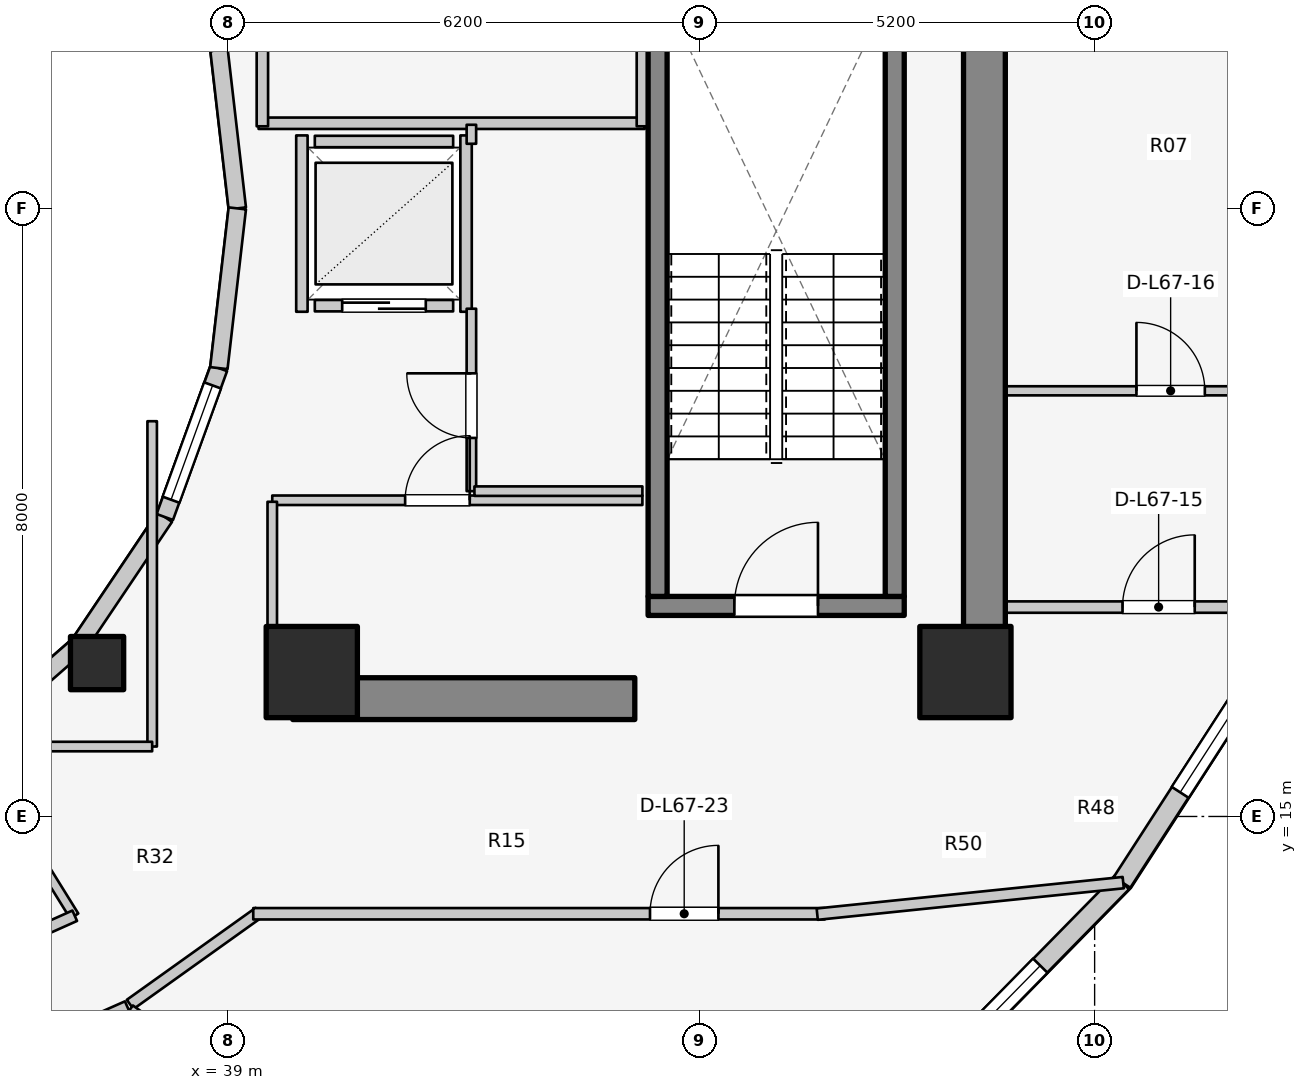
"""IFC4 building model, lengths in metres.
Left out: names, types, materials, properties, quantities, classifications, styles, units other than length and angle.
Written with IfcOpenShell. Run it as: python <this file> out.ifc"""

import sys

from ifc_helpers import new_model, si_unit, direction, frame, frame_2d, origin, origin_2d, place, context, subcontext, project, spatial, rectangle, extrude, element, fill, save


model = new_model("IFC4")
c1 = context("Model", 3, precision=1e-05, world=origin(), true_north=direction((0.0, 1.0)))
c2 = subcontext(c1, "Body", "Model", "MODEL_VIEW")
j1 = project(units=[si_unit("LENGTHUNIT", "METRE"), si_unit("PLANEANGLEUNIT", "RADIAN")], contexts=[c1])
p1 = place(None, origin())
s1 = spatial("IfcSite", under=j1, at=p1, CompositionType="ELEMENT")
p2 = place(p1, origin())
s2 = spatial("IfcBuilding", under=s1, at=p2, CompositionType="ELEMENT")
p3 = place(p2, frame((0.0, 0.0, 220.2)))
s3 = spatial("IfcBuildingStorey", under=s2, at=p3, CompositionType="ELEMENT", Elevation=220.2)
p4 = place(p3, frame((48.95, 17.05, 0.0), z_axis=(0.0, 0.0, 1.0), x_axis=(0.0, 1.0, 0.0)))
e1 = element("IfcWall", 1, at=p4, inside=s3, PredefinedType="SHEAR", context=c2, shape_type="SweptSolid", body=[
    extrude(rectangle(XDim=12.8, YDim=0.55, at=frame_2d((6.4, 0.0))), origin(), (0.0, 0.0, 1.0), 3.1),
])
p5 = place(p3, frame((39.85, 16.55, 0.0), z_axis=(0.0, 0.0, 1.0), x_axis=(1.0, 0.0, 0.0)))
e2 = element("IfcWall", 2, at=p5, inside=s3, PredefinedType="SHEAR", context=c2, shape_type="SweptSolid", body=[
    extrude(rectangle(XDim=4.5, YDim=0.55, at=frame_2d((2.25, 0.0))), origin(), (0.0, 0.0, 1.0), 3.1),
])
p6 = place(p3, frame((44.525, 17.77, 0.0), z_axis=(0.0, 0.0, 1.0), x_axis=(1.0, 0.0, 0.0)))
e3 = element("IfcWall", 3, at=p6, inside=s3, PredefinedType="SOLIDWALL", context=c2, shape_type="SweptSolid", body=[
    extrude(rectangle(XDim=3.37, YDim=0.25, at=frame_2d((1.685, 0.0))), origin(), (0.0, 0.0, 1.0), 3.1),
])
p7 = place(p6, frame((1.135, 0.0, 0.0)))
e4 = element("IfcOpeningElement", 4, at=p7, cuts=e3, PredefinedType="OPENING", context=c2, shape_type="SweptSolid", body=[
    extrude(rectangle(XDim=1.1, YDim=2.1, at=frame_2d((0.55, 1.05))), frame((0.0, 0.135, 0.0), z_axis=(0.0, -1.0, 0.0), x_axis=(1.0, 0.0, 0.0)), (0.0, 0.0, 1.0), 0.27),
])
for number, where, z_axis, x_axis in (
    (5, (44.65, 17.895, 0.0), (0.0, 0.0, 1.0), (0.0, 1.0, 0.0)),
    (6, (47.77, 17.895, 0.0), (0.0, 0.0, 1.0), (0.0, 1.0, 0.0)),
):
    element("IfcWall", number, at=place(p3, frame(where, z_axis=z_axis, x_axis=x_axis)), inside=s3, PredefinedType="SOLIDWALL", context=c2, shape_type="SweptSolid", body=[
        extrude(rectangle(XDim=7.81, YDim=0.25, at=frame_2d((3.905, 0.0))), origin(), (0.0, 0.0, 1.0), 3.1),
    ])
for number, where, z_axis, x_axis in (
    (7, (40.1, 16.9, 0.0), (0.0, 0.0, 1.0), (1.0, 0.0, 0.0)),
    (8, (48.7, 16.9, 0.0), (0.0, 0.0, 1.0), (1.0, 0.0, 0.0)),
):
    element("IfcColumn", number, at=place(p3, frame(where, z_axis=z_axis, x_axis=x_axis)), inside=s3, PredefinedType="COLUMN", context=c2, shape_type="SweptSolid", body=[
        extrude(rectangle(XDim=1.2, YDim=1.2, at=origin_2d()), origin(), (0.0, 0.0, 1.0), 3.1),
    ])
p8 = place(p3, frame((37.275, 17.018, 0.0), z_axis=(0.0, 0.0, 1.0), x_axis=(1.0, 0.0, 0.0)))
e9 = element("IfcColumn", 9, at=p8, inside=s3, PredefinedType="COLUMN", context=c2, shape_type="SweptSolid", body=[
    extrude(rectangle(XDim=0.7, YDim=0.7, at=origin_2d()), origin(), (0.0, 0.0, 1.0), 3.1),
])
p9 = place(p3, frame((39.12, 23.0, 0.0), z_axis=(0.0, 0.0, 1.0), x_axis=(-0.114711713601, 0.993398823617, 0.0)))
e10 = element("IfcWall", 10, at=p9, inside=s3, PredefinedType="STANDARD", context=c2, shape_type="SweptSolid", body=[
    extrude(rectangle(XDim=2.115, YDim=0.23, at=frame_2d((1.058, 0.0))), origin(), (0.0, 0.0, 1.0), 2.84),
])
p10 = place(p3, frame((35.56, 15.968, 0.0), z_axis=(0.0, 0.0, 1.0), x_axis=(0.752576694707, 0.658504607869, 0.0)))
e11 = element("IfcWall", 11, at=p10, inside=s3, PredefinedType="STANDARD", context=c2, shape_type="SweptSolid", body=[
    extrude(rectangle(XDim=1.959, YDim=0.23, at=frame_2d((0.98, 0.0))), origin(), (0.0, 0.0, 1.0), 2.16),
])
p11 = place(p3, frame((37.035, 17.258, 0.0), z_axis=(0.0, 0.0, 1.0), x_axis=(0.558197800898, 0.829707909492, 0.0)))
e12 = element("IfcWall", 12, at=p11, inside=s3, PredefinedType="STANDARD", context=c2, shape_type="SweptSolid", body=[
    extrude(rectangle(XDim=2.027, YDim=0.23, at=frame_2d((1.013, 0.0))), origin(), (0.0, 0.0, 1.0), 2.16),
])
p12 = place(p3, frame((38.166, 18.94, 0.0), z_axis=(0.0, 0.0, 1.0), x_axis=(0.341423187295, 0.93990968033, 0.0)))
e13 = element("IfcWall", 13, at=p12, inside=s3, PredefinedType="STANDARD", context=c2, shape_type="SweptSolid", body=[
    extrude(rectangle(XDim=2.084, YDim=0.23, at=frame_2d((1.042, 0.0))), origin(), (0.0, 0.0, 1.0), 2.84),
])
p13 = place(p12, frame((0.242, 0.0, 0.85)))
e14 = element("IfcOpeningElement", 14, at=p13, cuts=e13, PredefinedType="OPENING", context=c2, shape_type="SweptSolid", body=[
    extrude(rectangle(XDim=1.6, YDim=1.65, at=frame_2d((0.8, 0.825))), frame((0.0, 0.125, 0.0), z_axis=(0.0, -1.0, 0.0), x_axis=(1.0, 0.0, 0.0)), (0.0, 0.0, 1.0), 0.25),
])
p14 = place(p3, frame((38.877, 20.898, 0.0), z_axis=(0.0, 0.0, 1.0), x_axis=(0.114711713601, 0.993398823617, 0.0)))
e15 = element("IfcWall", 15, at=p14, inside=s3, PredefinedType="STANDARD", context=c2, shape_type="SweptSolid", body=[
    extrude(rectangle(XDim=2.115, YDim=0.23, at=frame_2d((1.058, 0.0))), origin(), (0.0, 0.0, 1.0), 2.84),
])
p15 = place(p3, frame((47.558, 10.871, 0.0), z_axis=(0.0, 0.0, 1.0), x_axis=(0.700642973333, 0.713512034881, 0.0)))
e16 = element("IfcWall", 16, at=p15, inside=s3, PredefinedType="STANDARD", context=c2, shape_type="SweptSolid", body=[
    extrude(rectangle(XDim=4.572, YDim=0.26, at=frame_2d((2.286, 0.0))), origin(), (0.0, 0.0, 1.0), 2.85),
])
p16 = place(p15, frame((1.536, 0.0, 0.75)))
e17 = element("IfcOpeningElement", 17, at=p16, cuts=e16, PredefinedType="OPENING", context=c2, shape_type="SweptSolid", body=[
    extrude(rectangle(XDim=1.5, YDim=1.6, at=frame_2d((0.75, 0.8))), frame((0.0, 0.14, 0.0), z_axis=(0.0, -1.0, 0.0), x_axis=(1.0, 0.0, 0.0)), (0.0, 0.0, 1.0), 0.28),
])
p17 = place(p3, frame((50.761, 14.133, 0.0), z_axis=(0.0, 0.0, 1.0), x_axis=(0.542641766008, 0.839964233634, 0.0)))
e18 = element("IfcWall", 18, at=p17, inside=s3, PredefinedType="STANDARD", context=c2, shape_type="SweptSolid", body=[
    extrude(rectangle(XDim=4.319, YDim=0.26, at=frame_2d((2.16, 0.0))), origin(), (0.0, 0.0, 1.0), 2.85),
])
p18 = place(p17, frame((1.41, 0.0, 0.75)))
e19 = element("IfcOpeningElement", 19, at=p18, cuts=e18, PredefinedType="OPENING", context=c2, shape_type="SweptSolid", body=[
    extrude(rectangle(XDim=1.5, YDim=1.6, at=frame_2d((0.75, 0.8))), frame((0.0, 0.14, 0.0), z_axis=(0.0, -1.0, 0.0), x_axis=(1.0, 0.0, 0.0)), (0.0, 0.0, 1.0), 0.28),
])
p19 = place(p3, frame((40.14, 21.72, 0.0), z_axis=(0.0, 0.0, 1.0), x_axis=(1.0, 0.0, 0.0)))
e20 = element("IfcWall", 20, at=p19, inside=s3, PredefinedType="SOLIDWALL", context=c2, shape_type="SweptSolid", body=[
    extrude(rectangle(XDim=1.82, YDim=0.15, at=frame_2d((0.91, 0.0))), origin(), (0.0, 0.0, 1.0), 2.12),
])
p20 = place(p19, frame((0.36, 0.0, 0.0)))
e21 = element("IfcOpeningElement", 21, at=p20, cuts=e20, PredefinedType="OPENING", context=c2, shape_type="SweptSolid", body=[
    extrude(rectangle(XDim=1.1, YDim=2.1, at=frame_2d((0.55, 1.05))), frame((0.0, 0.085, 0.0), z_axis=(0.0, -1.0, 0.0), x_axis=(1.0, 0.0, 0.0)), (0.0, 0.0, 1.0), 0.17),
])
p21 = place(p3, frame((40.14, 23.88, 0.0), z_axis=(0.0, 0.0, 1.0), x_axis=(1.0, 0.0, 0.0)))
e22 = element("IfcWall", 22, at=p21, inside=s3, PredefinedType="SOLIDWALL", context=c2, shape_type="SweptSolid", body=[
    extrude(rectangle(XDim=1.82, YDim=0.15, at=frame_2d((0.91, 0.0))), origin(), (0.0, 0.0, 1.0), 2.12),
])
p22 = place(p3, frame((39.97, 21.64, 0.0), z_axis=(0.0, 0.0, 1.0), x_axis=(0.0, 1.0, 0.0)))
e23 = element("IfcWall", 23, at=p22, inside=s3, PredefinedType="SOLIDWALL", context=c2, shape_type="SweptSolid", body=[
    extrude(rectangle(XDim=2.32, YDim=0.15, at=frame_2d((1.16, 0.0))), origin(), (0.0, 0.0, 1.0), 2.12),
])
p23 = place(p3, frame((42.13, 21.64, 0.0), z_axis=(0.0, 0.0, 1.0), x_axis=(0.0, 1.0, 0.0)))
e24 = element("IfcWall", 24, at=p23, inside=s3, PredefinedType="SOLIDWALL", context=c2, shape_type="SweptSolid", body=[
    extrude(rectangle(XDim=2.32, YDim=0.15, at=frame_2d((1.16, 0.0))), origin(), (0.0, 0.0, 1.0), 2.855),
])
p24 = place(p3, frame((39.4, 24.12, 0.0), z_axis=(0.0, 0.0, 1.0), x_axis=(1.0, 0.0, 0.0)))
e25 = element("IfcWall", 25, at=p24, inside=s3, PredefinedType="PARTITIONING", context=c2, shape_type="SweptSolid", body=[
    extrude(rectangle(XDim=5.08, YDim=0.15, at=frame_2d((2.54, 0.0))), origin(), (0.0, 0.0, 1.0), 2.12),
])
p25 = place(p3, frame((44.45, 24.08, 0.0), z_axis=(0.0, 0.0, 1.0), x_axis=(0.0, 1.0, 0.0)))
e26 = element("IfcWall", 26, at=p25, inside=s3, PredefinedType="PARTITIONING", context=c2, shape_type="SweptSolid", body=[
    extrude(rectangle(XDim=3.2, YDim=0.15, at=frame_2d((1.6, 0.0))), origin(), (0.0, 0.0, 1.0), 2.855),
])
p26 = place(p3, frame((39.45, 24.08, 0.0), z_axis=(0.0, 0.0, 1.0), x_axis=(0.0, 1.0, 0.0)))
e27 = element("IfcWall", 27, at=p26, inside=s3, PredefinedType="PARTITIONING", context=c2, shape_type="SweptSolid", body=[
    extrude(rectangle(XDim=3.4, YDim=0.15, at=frame_2d((1.7, 0.0))), origin(), (0.0, 0.0, 1.0), 2.855),
])
p27 = place(p26, frame((1.894, 0.0, 0.0)))
e28 = element("IfcOpeningElement", 28, at=p27, cuts=e27, PredefinedType="OPENING", context=c2, shape_type="SweptSolid", body=[
    extrude(rectangle(XDim=1.1, YDim=2.1, at=frame_2d((0.55, 1.05))), frame((0.0, 0.085, 0.0), z_axis=(0.0, -1.0, 0.0), x_axis=(1.0, 0.0, 0.0)), (0.0, 0.0, 1.0), 0.17),
])
p28 = place(p3, frame((39.58, 19.16, 0.0), z_axis=(0.0, 0.0, 1.0), x_axis=(1.0, 0.0, 0.0)))
e29 = element("IfcWall", 29, at=p28, inside=s3, PredefinedType="PARTITIONING", context=c2, shape_type="SweptSolid", body=[
    extrude(rectangle(XDim=4.87, YDim=0.125, at=frame_2d((2.435, 0.0))), origin(), (0.0, 0.0, 1.0), 2.12),
])
p29 = place(p28, frame((1.748, 0.0, 0.0)))
e30 = element("IfcOpeningElement", 30, at=p29, cuts=e29, PredefinedType="OPENING", context=c2, shape_type="SweptSolid", body=[
    extrude(rectangle(XDim=0.85, YDim=2.05, at=frame_2d((0.425, 1.025))), frame((0.0, 0.073, 0.0), z_axis=(0.0, -1.0, 0.0), x_axis=(1.0, 0.0, 0.0)), (0.0, 0.0, 1.0), 0.145),
])
p30 = place(p3, frame((39.58, 17.1, 0.0), z_axis=(0.0, 0.0, 1.0), x_axis=(0.0, 1.0, 0.0)))
e31 = element("IfcWall", 31, at=p30, inside=s3, PredefinedType="PARTITIONING", context=c2, shape_type="SweptSolid", body=[
    extrude(rectangle(XDim=2.04, YDim=0.125, at=frame_2d((1.02, 0.0))), origin(), (0.0, 0.0, 1.0), 2.232),
])
p31 = place(p3, frame((42.2, 19.28, 0.0), z_axis=(0.0, 0.0, 1.0), x_axis=(0.0, 1.0, 0.0)))
e32 = element("IfcWall", 32, at=p31, inside=s3, PredefinedType="PARTITIONING", context=c2, shape_type="SweptSolid", body=[
    extrude(rectangle(XDim=2.4, YDim=0.125, at=frame_2d((1.2, 0.0))), origin(), (0.0, 0.0, 1.0), 2.855),
])
p32 = place(p31, frame((0.7, 0.0, 0.0)))
e33 = element("IfcOpeningElement", 33, at=p32, cuts=e32, PredefinedType="OPENING", context=c2, shape_type="SweptSolid", body=[
    extrude(rectangle(XDim=0.85, YDim=2.05, at=frame_2d((0.425, 1.025))), frame((0.0, 0.073, 0.0), z_axis=(0.0, -1.0, 0.0), x_axis=(1.0, 0.0, 0.0)), (0.0, 0.0, 1.0), 0.145),
])
p33 = place(p3, frame((42.2, 23.85, 0.0), z_axis=(0.0, 0.0, 1.0), x_axis=(0.0, 1.0, 0.0)))
e34 = element("IfcWall", 34, at=p33, inside=s3, PredefinedType="PARTITIONING", context=c2, shape_type="SweptSolid", body=[
    extrude(rectangle(XDim=0.25, YDim=0.125, at=frame_2d((0.125, 0.0))), origin(), (0.0, 0.0, 1.0), 2.855),
])
p34 = place(p3, frame((42.24, 19.28, 0.0), z_axis=(0.0, 0.0, 1.0), x_axis=(1.0, 0.0, 0.0)))
e35 = element("IfcWall", 35, at=p34, inside=s3, PredefinedType="PARTITIONING", context=c2, shape_type="SweptSolid", body=[
    extrude(rectangle(XDim=2.21, YDim=0.125, at=frame_2d((1.105, 0.0))), origin(), (0.0, 0.0, 1.0), 2.12),
])
p35 = place(p3, frame((35.55, 15.985, 0.0), z_axis=(0.0, 0.0, 1.0), x_axis=(0.527527080983, -0.849538215049, 0.0)))
e36 = element("IfcWall", 36, at=p35, inside=s3, PredefinedType="PARTITIONING", context=c2, shape_type="SweptSolid", body=[
    extrude(rectangle(XDim=2.701, YDim=0.125, at=frame_2d((1.351, 0.0))), origin(), (0.0, 0.0, 1.0), 2.376),
])
p36 = place(p3, frame((34.573, 12.616, 0.0), z_axis=(0.0, 0.0, 1.0), x_axis=(0.912628408652, 0.408790151203, 0.0)))
e37 = element("IfcWall", 37, at=p36, inside=s3, PredefinedType="PARTITIONING", context=c2, shape_type="SweptSolid", body=[
    extrude(rectangle(XDim=2.638, YDim=0.15, at=frame_2d((1.319, 0.0))), origin(), (0.0, 0.0, 1.0), 2.376),
])
p37 = place(p36, frame((0.844, 0.0, 0.0)))
e38 = element("IfcOpeningElement", 38, at=p37, cuts=e37, PredefinedType="OPENING", context=c2, shape_type="SweptSolid", body=[
    extrude(rectangle(XDim=0.95, YDim=2.1, at=frame_2d((0.475, 1.05))), frame((0.0, 0.085, 0.0), z_axis=(0.0, -1.0, 0.0), x_axis=(1.0, 0.0, 0.0)), (0.0, 0.0, 1.0), 0.17),
])
p38 = place(p3, frame((38.0, 15.92, 0.0), z_axis=(0.0, 0.0, 1.0), x_axis=(0.0, 1.0, 0.0)))
e39 = element("IfcWall", 39, at=p38, inside=s3, PredefinedType="PARTITIONING", context=c2, shape_type="SweptSolid", body=[
    extrude(rectangle(XDim=4.28, YDim=0.125, at=frame_2d((2.14, 0.0))), origin(), (0.0, 0.0, 1.0), 2.232),
])
p39 = place(p3, frame((35.4, 15.92, 0.0), z_axis=(0.0, 0.0, 1.0), x_axis=(1.0, 0.0, 0.0)))
e40 = element("IfcWall", 40, at=p39, inside=s3, PredefinedType="PARTITIONING", context=c2, shape_type="SweptSolid", body=[
    extrude(rectangle(XDim=2.6, YDim=0.125, at=frame_2d((1.3, 0.0))), origin(), (0.0, 0.0, 1.0), 2.232),
])
p40 = place(p3, frame((48.95, 17.755, 0.0), z_axis=(0.0, 0.0, 1.0), x_axis=(1.0, 0.0, 0.0)))
e41 = element("IfcWall", 41, at=p40, inside=s3, PredefinedType="PARTITIONING", context=c2, shape_type="SweptSolid", body=[
    extrude(rectangle(XDim=4.175, YDim=0.15, at=frame_2d((2.087, 0.0))), origin(), (0.0, 0.0, 1.0), 2.855),
])
p41 = place(p40, frame((1.817, 0.0, 0.0)))
e42 = element("IfcOpeningElement", 42, at=p41, cuts=e41, PredefinedType="OPENING", context=c2, shape_type="SweptSolid", body=[
    extrude(rectangle(XDim=0.95, YDim=2.1, at=frame_2d((0.475, 1.05))), frame((0.0, 0.085, 0.0), z_axis=(0.0, -1.0, 0.0), x_axis=(1.0, 0.0, 0.0)), (0.0, 0.0, 1.0), 0.17),
])
p42 = place(p3, frame((48.95, 20.6, 0.0), z_axis=(0.0, 0.0, 1.0), x_axis=(1.0, 0.0, 0.0)))
e43 = element("IfcWall", 43, at=p42, inside=s3, PredefinedType="MOVABLE", context=c2, shape_type="SweptSolid", body=[
    extrude(rectangle(XDim=4.524, YDim=0.12, at=frame_2d((2.262, 0.0))), origin(), (0.0, 0.0, 1.0), 2.855),
])
p43 = place(p42, frame((2.0, 0.0, 0.0)))
e44 = element("IfcOpeningElement", 44, at=p43, cuts=e43, PredefinedType="OPENING", context=c2, shape_type="SweptSolid", body=[
    extrude(rectangle(XDim=0.9, YDim=2.1, at=frame_2d((0.45, 1.05))), frame((0.0, 0.07, 0.0), z_axis=(0.0, -1.0, 0.0), x_axis=(1.0, 0.0, 0.0)), (0.0, 0.0, 1.0), 0.14),
])
p44 = place(p3, frame((37.71, 12.527, 0.0), z_axis=(0.0, 0.0, 1.0), x_axis=(0.813780999276, 0.581171648669, 0.0)))
e45 = element("IfcWall", 45, at=p44, inside=s3, PredefinedType="PARTITIONING", context=c2, shape_type="SweptSolid", body=[
    extrude(rectangle(XDim=2.082, YDim=0.15, at=frame_2d((1.041, 0.0))), origin(), (0.0, 0.0, 1.0), 2.376),
])
p45 = place(p3, frame((39.33, 13.72, 0.0), z_axis=(0.0, 0.0, 1.0), x_axis=(1.0, 0.0, 0.0)))
e46 = element("IfcWall", 46, at=p45, inside=s3, PredefinedType="PARTITIONING", context=c2, shape_type="SweptSolid", body=[
    extrude(rectangle(XDim=7.52, YDim=0.15, at=frame_2d((3.76, 0.0))), origin(), (0.0, 0.0, 1.0), 2.376),
])
p46 = place(p45, frame((5.22, 0.0, 0.0)))
e47 = element("IfcOpeningElement", 47, at=p46, cuts=e46, PredefinedType="OPENING", context=c2, shape_type="SweptSolid", body=[
    extrude(rectangle(XDim=0.9, YDim=2.1, at=frame_2d((0.45, 1.05))), frame((0.0, 0.085, 0.0), z_axis=(0.0, -1.0, 0.0), x_axis=(1.0, 0.0, 0.0)), (0.0, 0.0, 1.0), 0.17),
])
p47 = place(p3, frame((46.75, 13.715, 0.0), z_axis=(0.0, 0.0, 1.0), x_axis=(0.994734711466, 0.102483431859, 0.0)))
e48 = element("IfcWall", 48, at=p47, inside=s3, PredefinedType="PARTITIONING", context=c2, shape_type="SweptSolid", body=[
    extrude(rectangle(XDim=4.047, YDim=0.15, at=frame_2d((2.024, 0.0))), origin(), (0.0, 0.0, 1.0), 2.22),
])
p48 = place(p3, frame((37.71, 12.463, 0.0), z_axis=(0.0, 0.0, 1.0), x_axis=(0.813163816543, -0.582034885093, 0.0)))
e49 = element("IfcWall", 49, at=p48, inside=s3, PredefinedType="PARTITIONING", context=c2, shape_type="SweptSolid", body=[
    extrude(rectangle(XDim=6.955, YDim=0.125, at=frame_2d((3.477, 0.0))), origin(), (0.0, 0.0, 1.0), 2.376),
])
p49 = place(p3, frame((34.925, 11.281, 0.0), z_axis=(0.0, 0.0, 1.0), x_axis=(0.914139569865, 0.405399613724, 0.0)))
e50 = element("IfcWall", 50, at=p49, inside=s3, PredefinedType="PARTITIONING", context=c2, shape_type="SweptSolid", body=[
    extrude(rectangle(XDim=3.005, YDim=0.15, at=frame_2d((1.502, 0.0))), origin(), (0.0, 0.0, 1.0), 2.376),
])
p50 = place(p49, frame((1.002, 0.0, 0.0)))
e51 = element("IfcOpeningElement", 51, at=p50, cuts=e50, PredefinedType="OPENING", context=c2, shape_type="SweptSolid", body=[
    extrude(rectangle(XDim=1.0, YDim=2.1, at=frame_2d((0.5, 1.05))), frame((0.0, 0.085, 0.0), z_axis=(0.0, -1.0, 0.0), x_axis=(1.0, 0.0, 0.0)), (0.0, 0.0, 1.0), 0.17),
])
p51 = place(p13, origin())
e52 = element("IfcWindow", 52, at=p51, inside=s3, PartitioningType="SINGLE_PANEL", PredefinedType="WINDOW", context=c2, shape_type="SweptSolid", body=[
    extrude(rectangle(XDim=1.6, YDim=1.65, at=frame_2d((0.8, 0.825))), frame((0.0, 0.03, 0.0), z_axis=(0.0, -1.0, 0.0), x_axis=(1.0, 0.0, 0.0)), (0.0, 0.0, 1.0), 0.06),
])
fill(e14, e52)
p52 = place(p16, origin())
e53 = element("IfcWindow", 53, at=p52, inside=s3, PartitioningType="SINGLE_PANEL", PredefinedType="WINDOW", context=c2, shape_type="SweptSolid", body=[
    extrude(rectangle(XDim=1.5, YDim=1.6, at=frame_2d((0.75, 0.8))), frame((0.0, 0.03, 0.0), z_axis=(0.0, -1.0, 0.0), x_axis=(1.0, 0.0, 0.0)), (0.0, 0.0, 1.0), 0.06),
])
fill(e17, e53)
p53 = place(p18, origin())
e54 = element("IfcWindow", 54, at=p53, inside=s3, PartitioningType="SINGLE_PANEL", PredefinedType="WINDOW", context=c2, shape_type="SweptSolid", body=[
    extrude(rectangle(XDim=1.5, YDim=1.6, at=frame_2d((0.75, 0.8))), frame((0.0, 0.03, 0.0), z_axis=(0.0, -1.0, 0.0), x_axis=(1.0, 0.0, 0.0)), (0.0, 0.0, 1.0), 0.06),
])
fill(e19, e54)
p54 = place(p7, origin())
e55 = element("IfcDoor", 55, at=p54, inside=s3, OperationType="SINGLE_SWING_RIGHT", PredefinedType="DOOR", context=c2, shape_type="SweptSolid", body=[
    extrude(rectangle(XDim=1.1, YDim=2.1, at=frame_2d((0.55, 1.05))), frame((0.0, 0.025, 0.0), z_axis=(0.0, -1.0, 0.0), x_axis=(1.0, 0.0, 0.0)), (0.0, 0.0, 1.0), 0.05),
])
fill(e4, e55)
p55 = place(p20, origin())
e56 = element("IfcDoor", 56, at=p55, inside=s3, OperationType="DOUBLE_DOOR_SLIDING", PredefinedType="DOOR", context=c2, shape_type="SweptSolid", body=[
    extrude(rectangle(XDim=1.1, YDim=2.1, at=frame_2d((0.55, 1.05))), frame((0.0, 0.025, 0.0), z_axis=(0.0, -1.0, 0.0), x_axis=(1.0, 0.0, 0.0)), (0.0, 0.0, 1.0), 0.05),
])
fill(e21, e56)
p56 = place(p29, origin())
e57 = element("IfcDoor", 57, at=p56, inside=s3, OperationType="SINGLE_SWING_RIGHT", PredefinedType="DOOR", context=c2, shape_type="SweptSolid", body=[
    extrude(rectangle(XDim=0.85, YDim=2.05, at=frame_2d((0.425, 1.025))), frame((0.0, 0.025, 0.0), z_axis=(0.0, -1.0, 0.0), x_axis=(1.0, 0.0, 0.0)), (0.0, 0.0, 1.0), 0.05),
])
fill(e30, e57)
p57 = place(p32, origin())
e58 = element("IfcDoor", 58, at=p57, inside=s3, OperationType="SINGLE_SWING_RIGHT", PredefinedType="DOOR", context=c2, shape_type="SweptSolid", body=[
    extrude(rectangle(XDim=0.85, YDim=2.05, at=frame_2d((0.425, 1.025))), frame((0.0, 0.025, 0.0), z_axis=(0.0, -1.0, 0.0), x_axis=(1.0, 0.0, 0.0)), (0.0, 0.0, 1.0), 0.05),
])
fill(e33, e58)
p58 = place(p41, origin())
e59 = element("IfcDoor", 59, at=p58, inside=s3, OperationType="SINGLE_SWING_RIGHT", PredefinedType="DOOR", context=c2, shape_type="SweptSolid", body=[
    extrude(rectangle(XDim=0.95, YDim=2.1, at=frame_2d((0.475, 1.05))), frame((0.0, 0.025, 0.0), z_axis=(0.0, -1.0, 0.0), x_axis=(1.0, 0.0, 0.0)), (0.0, 0.0, 1.0), 0.05),
])
fill(e42, e59)
p59 = place(p43, origin())
e60 = element("IfcDoor", 60, at=p59, inside=s3, OperationType="SINGLE_SWING_LEFT", PredefinedType="DOOR", context=c2, shape_type="SweptSolid", body=[
    extrude(rectangle(XDim=0.9, YDim=2.1, at=frame_2d((0.45, 1.05))), frame((0.0, 0.025, 0.0), z_axis=(0.0, -1.0, 0.0), x_axis=(1.0, 0.0, 0.0)), (0.0, 0.0, 1.0), 0.05),
])
fill(e44, e60)
p60 = place(p46, origin())
e61 = element("IfcDoor", 61, at=p60, inside=s3, OperationType="SINGLE_SWING_RIGHT", PredefinedType="DOOR", context=c2, shape_type="SweptSolid", body=[
    extrude(rectangle(XDim=0.9, YDim=2.1, at=frame_2d((0.45, 1.05))), frame((0.0, 0.025, 0.0), z_axis=(0.0, -1.0, 0.0), x_axis=(1.0, 0.0, 0.0)), (0.0, 0.0, 1.0), 0.05),
])
fill(e47, e61)
save(model, sys.argv[1])
